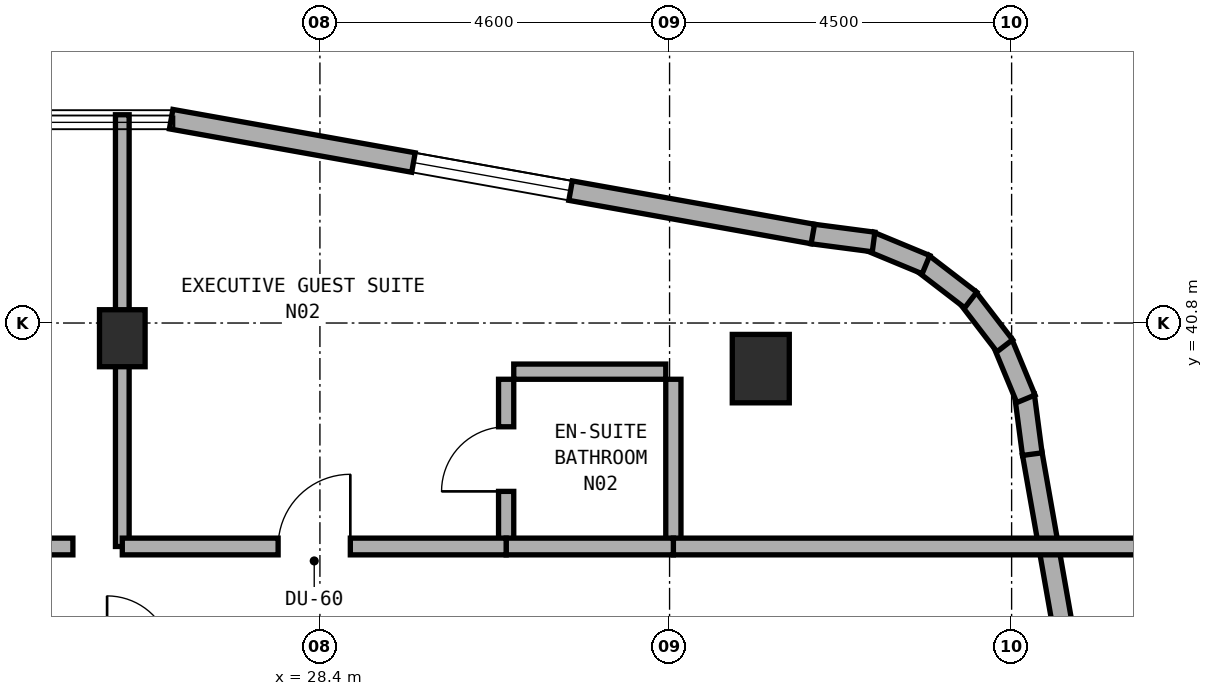
"""IFC4 building model, lengths in metres.
Left out: names, types, materials, properties, quantities, classifications, styles, units other than length and angle.
Written with IfcOpenShell. Run it as: python <this file> out.ifc"""

import sys

from ifc_helpers import new_model, si_unit, direction, frame, frame_2d, origin, origin_2d, place, context, subcontext, project, spatial, rectangle, extrude, element, fill, save


model = new_model("IFC4")
c1 = context("Model", 3, precision=1e-05, world=origin(), true_north=direction((0.0, 1.0)))
c2 = subcontext(c1, "Body", "Model", "MODEL_VIEW")
j1 = project(units=[si_unit("LENGTHUNIT", "METRE"), si_unit("PLANEANGLEUNIT", "RADIAN")], contexts=[c1])
p1 = place(None, origin())
s1 = spatial("IfcSite", under=j1, at=p1, CompositionType="ELEMENT")
p2 = place(p1, origin())
s2 = spatial("IfcBuilding", under=s1, at=p2, CompositionType="ELEMENT")
p3 = place(p2, frame((0.0, 0.0, 246.8)))
s3 = spatial("IfcBuildingStorey", under=s2, at=p3, CompositionType="ELEMENT", Elevation=246.8)
p4 = place(p3, frame((25.8, 40.6, 0.0), z_axis=(0.0, 0.0, 1.0), x_axis=(1.0, 0.0, 0.0)))
e1 = element("IfcColumn", 1, at=p4, inside=s3, PredefinedType="COLUMN", context=c2, shape_type="SweptSolid", body=[
    extrude(rectangle(XDim=0.6, YDim=0.75, at=origin_2d()), origin(), (0.0, 0.0, 1.0), 3.6),
])
p5 = place(p3, frame((34.2, 40.2, 0.0), z_axis=(0.0, 0.0, 1.0), x_axis=(1.0, 0.0, 0.0)))
e2 = element("IfcColumn", 2, at=p5, inside=s3, PredefinedType="COLUMN", context=c2, shape_type="SweptSolid", body=[
    extrude(rectangle(XDim=0.75, YDim=0.9, at=origin_2d()), origin(), (0.0, 0.0, 1.0), 3.6),
])
p6 = place(p3, frame((39.282, 30.503, 0.0), z_axis=(0.0, 0.0, 1.0), x_axis=(-0.173396937698, 0.984852020355, 0.0)))
e3 = element("IfcWall", 3, at=p6, inside=s3, PredefinedType="STANDARD", context=c2, shape_type="SweptSolid", body=[
    extrude(rectangle(XDim=8.714, YDim=0.26, at=frame_2d((4.357, 0.0))), origin(), (0.0, 0.0, 1.0), 3.32),
])
p7 = place(p6, frame((1.967, 0.0, 0.85)))
e4 = element("IfcOpeningElement", 4, at=p7, cuts=e3, PredefinedType="OPENING", context=c2, shape_type="SweptSolid", body=[
    extrude(rectangle(XDim=2.1, YDim=1.5, at=frame_2d((1.05, 0.75))), frame((0.0, 0.14, 0.0), z_axis=(0.0, -1.0, 0.0), x_axis=(1.0, 0.0, 0.0)), (0.0, 0.0, 1.0), 0.28),
])
p8 = place(p3, frame((37.772, 39.075, 0.0), z_axis=(0.0, 0.0, 1.0), x_axis=(-0.130689052056, 0.991423406861, 0.0)))
e5 = element("IfcWall", 5, at=p8, inside=s3, PredefinedType="STANDARD", context=c2, shape_type="SweptSolid", body=[
    extrude(rectangle(XDim=0.781, YDim=0.26, at=frame_2d((0.39, 0.0))), origin(), (0.0, 0.0, 1.0), 3.32),
])
p9 = place(p3, frame((37.688, 39.803, 0.0), z_axis=(0.0, 0.0, 1.0), x_axis=(-0.382900540965, 0.923789573295, 0.0)))
e6 = element("IfcWall", 6, at=p9, inside=s3, PredefinedType="STANDARD", context=c2, shape_type="SweptSolid", body=[
    extrude(rectangle(XDim=0.799, YDim=0.26, at=frame_2d((0.399, 0.0))), origin(), (0.0, 0.0, 1.0), 3.32),
])
p10 = place(p3, frame((37.41, 40.501, 0.0), z_axis=(0.0, 0.0, 1.0), x_axis=(-0.608823262828, 0.793305889705, 0.0)))
e7 = element("IfcWall", 7, at=p10, inside=s3, PredefinedType="STANDARD", context=c2, shape_type="SweptSolid", body=[
    extrude(rectangle(XDim=0.798, YDim=0.26, at=frame_2d((0.399, 0.0))), origin(), (0.0, 0.0, 1.0), 3.32),
])
p11 = place(p3, frame((36.962, 41.103, 0.0), z_axis=(0.0, 0.0, 1.0), x_axis=(-0.793044635519, 0.60916352983, 0.0)))
e8 = element("IfcWall", 8, at=p11, inside=s3, PredefinedType="STANDARD", context=c2, shape_type="SweptSolid", body=[
    extrude(rectangle(XDim=0.798, YDim=0.26, at=frame_2d((0.399, 0.0))), origin(), (0.0, 0.0, 1.0), 3.32),
])
p12 = place(p3, frame((36.373, 41.568, 0.0), z_axis=(0.0, 0.0, 1.0), x_axis=(-0.923789573295, 0.382900540965, 0.0)))
e9 = element("IfcWall", 9, at=p12, inside=s3, PredefinedType="STANDARD", context=c2, shape_type="SweptSolid", body=[
    extrude(rectangle(XDim=0.799, YDim=0.26, at=frame_2d((0.399, 0.0))), origin(), (0.0, 0.0, 1.0), 3.32),
])
p13 = place(p3, frame((35.684, 41.866, 0.0), z_axis=(0.0, 0.0, 1.0), x_axis=(-0.99153354416, 0.129850802102, 0.0)))
e10 = element("IfcWall", 10, at=p13, inside=s3, PredefinedType="STANDARD", context=c2, shape_type="SweptSolid", body=[
    extrude(rectangle(XDim=0.816, YDim=0.26, at=frame_2d((0.408, 0.0))), origin(), (0.0, 0.0, 1.0), 3.32),
])
p14 = place(p3, frame((34.885, 41.971, 0.0), z_axis=(0.0, 0.0, 1.0), x_axis=(-0.98435676639, 0.176186709098, 0.0)))
e11 = element("IfcWall", 11, at=p14, inside=s3, PredefinedType="STANDARD", context=c2, shape_type="SweptSolid", body=[
    extrude(rectangle(XDim=8.576, YDim=0.26, at=frame_2d((4.288, 0.0))), origin(), (0.0, 0.0, 1.0), 3.32),
])
p15 = place(p14, frame((3.238, 0.0, 0.85)))
e12 = element("IfcOpeningElement", 12, at=p15, cuts=e11, PredefinedType="OPENING", context=c2, shape_type="SweptSolid", body=[
    extrude(rectangle(XDim=2.1, YDim=1.5, at=frame_2d((1.05, 0.75))), frame((0.0, 0.14, 0.0), z_axis=(0.0, -1.0, 0.0), x_axis=(1.0, 0.0, 0.0)), (0.0, 0.0, 1.0), 0.28),
])
p16 = place(p3, frame((19.85, 37.86, 0.0), z_axis=(0.0, 0.0, 1.0), x_axis=(1.0, 0.0, 0.0)))
e13 = element("IfcWall", 13, at=p16, inside=s3, PredefinedType="SOLIDWALL", context=c2, shape_type="SweptSolid", body=[
    extrude(rectangle(XDim=5.3, YDim=0.22, at=frame_2d((2.65, 0.0))), origin(), (0.0, 0.0, 1.0), 3.32),
])
p17 = place(p16, frame((1.88, 0.0, 0.0)))
e14 = element("IfcOpeningElement", 14, at=p17, cuts=e13, PredefinedType="OPENING", context=c2, shape_type="SweptSolid", body=[
    extrude(rectangle(XDim=1.1, YDim=2.1, at=frame_2d((0.55, 1.05))), frame((0.0, 0.12, 0.0), z_axis=(0.0, -1.0, 0.0), x_axis=(1.0, 0.0, 0.0)), (0.0, 0.0, 1.0), 0.24),
])
p18 = place(p3, frame((25.8, 37.86, 0.0), z_axis=(0.0, 0.0, 1.0), x_axis=(0.0, 1.0, 0.0)))
e15 = element("IfcWall", 15, at=p18, inside=s3, PredefinedType="SOLIDWALL", context=c2, shape_type="SweptSolid", body=[
    extrude(rectangle(XDim=5.68, YDim=0.18, at=frame_2d((2.84, 0.0))), origin(), (0.0, 0.0, 1.0), 2.745),
])
p19 = place(p3, frame((30.85, 37.96, 0.0), z_axis=(0.0, 0.0, 1.0), x_axis=(0.0, 1.0, 0.0)))
e16 = element("IfcWall", 16, at=p19, inside=s3, PredefinedType="PLUMBINGWALL", context=c2, shape_type="SweptSolid", body=[
    extrude(rectangle(XDim=2.1, YDim=0.2, at=frame_2d((1.05, 0.0))), origin(), (0.0, 0.0, 1.0), 3.025),
])
p20 = place(p19, frame((0.625, 0.0, 0.0)))
e17 = element("IfcOpeningElement", 17, at=p20, cuts=e16, PredefinedType="OPENING", context=c2, shape_type="SweptSolid", body=[
    extrude(rectangle(XDim=0.85, YDim=2.1, at=frame_2d((0.425, 1.05))), frame((0.0, 0.11, 0.0), z_axis=(0.0, -1.0, 0.0), x_axis=(1.0, 0.0, 0.0)), (0.0, 0.0, 1.0), 0.22),
])
p21 = place(p3, frame((30.95, 40.16, 0.0), z_axis=(0.0, 0.0, 1.0), x_axis=(1.0, 0.0, 0.0)))
e18 = element("IfcWall", 18, at=p21, inside=s3, PredefinedType="PLUMBINGWALL", context=c2, shape_type="SweptSolid", body=[
    extrude(rectangle(XDim=2.0, YDim=0.2, at=frame_2d((1.0, 0.0))), origin(), (0.0, 0.0, 1.0), 3.015),
])
p22 = place(p3, frame((33.05, 37.96, 0.0), z_axis=(0.0, 0.0, 1.0), x_axis=(0.0, 1.0, 0.0)))
e19 = element("IfcWall", 19, at=p22, inside=s3, PredefinedType="PLUMBINGWALL", context=c2, shape_type="SweptSolid", body=[
    extrude(rectangle(XDim=2.1, YDim=0.2, at=frame_2d((1.05, 0.0))), origin(), (0.0, 0.0, 1.0), 3.025),
])
p23 = place(p3, frame((33.05, 37.86, 0.0), z_axis=(0.0, 0.0, 1.0), x_axis=(1.0, 0.0, 0.0)))
e20 = element("IfcWall", 20, at=p23, inside=s3, PredefinedType="SOLIDWALL", context=c2, shape_type="SweptSolid", body=[
    extrude(rectangle(XDim=6.19, YDim=0.22, at=frame_2d((3.095, 0.0))), origin(), (0.0, 0.0, 1.0), 2.745),
])
p24 = place(p3, frame((30.85, 37.86, 0.0), z_axis=(0.0, 0.0, 1.0), x_axis=(1.0, 0.0, 0.0)))
e21 = element("IfcWall", 21, at=p24, inside=s3, PredefinedType="SOLIDWALL", context=c2, shape_type="SweptSolid", body=[
    extrude(rectangle(XDim=2.2, YDim=0.22, at=frame_2d((1.1, 0.0))), origin(), (0.0, 0.0, 1.0), 3.32),
])
p25 = place(p3, frame((25.8, 37.86, 0.0), z_axis=(0.0, 0.0, 1.0), x_axis=(1.0, 0.0, 0.0)))
e22 = element("IfcWall", 22, at=p25, inside=s3, PredefinedType="SOLIDWALL", context=c2, shape_type="SweptSolid", body=[
    extrude(rectangle(XDim=5.05, YDim=0.22, at=frame_2d((2.525, 0.0))), origin(), (0.0, 0.0, 1.0), 2.745),
])
p26 = place(p25, frame((2.05, 0.0, 0.0)))
e23 = element("IfcOpeningElement", 23, at=p26, cuts=e22, PredefinedType="OPENING", context=c2, shape_type="SweptSolid", body=[
    extrude(rectangle(XDim=0.95, YDim=2.1, at=frame_2d((0.475, 1.05))), frame((0.0, 0.12, 0.0), z_axis=(0.0, -1.0, 0.0), x_axis=(1.0, 0.0, 0.0)), (0.0, 0.0, 1.0), 0.24),
])
p27 = place(p15, origin())
e24 = element("IfcWindow", 24, at=p27, inside=s3, PartitioningType="SINGLE_PANEL", PredefinedType="WINDOW", context=c2, shape_type="SweptSolid", body=[
    extrude(rectangle(XDim=2.1, YDim=1.5, at=frame_2d((1.05, 0.75))), frame((0.0, 0.03, 0.0), z_axis=(0.0, -1.0, 0.0), x_axis=(1.0, 0.0, 0.0)), (0.0, 0.0, 1.0), 0.06),
])
fill(e12, e24)
p28 = place(p20, origin())
e25 = element("IfcDoor", 25, at=p28, inside=s3, OperationType="SINGLE_SWING_LEFT", PredefinedType="DOOR", context=c2, shape_type="SweptSolid", body=[
    extrude(rectangle(XDim=0.85, YDim=2.1, at=frame_2d((0.425, 1.05))), frame((0.0, 0.025, 0.0), z_axis=(0.0, -1.0, 0.0), x_axis=(1.0, 0.0, 0.0)), (0.0, 0.0, 1.0), 0.05),
])
fill(e17, e25)
p29 = place(p26, origin())
e26 = element("IfcDoor", 26, at=p29, inside=s3, OperationType="SINGLE_SWING_RIGHT", PredefinedType="DOOR", context=c2, shape_type="SweptSolid", body=[
    extrude(rectangle(XDim=0.95, YDim=2.1, at=frame_2d((0.475, 1.05))), frame((0.0, 0.025, 0.0), z_axis=(0.0, -1.0, 0.0), x_axis=(1.0, 0.0, 0.0)), (0.0, 0.0, 1.0), 0.05),
])
fill(e23, e26)
save(model, sys.argv[1])
